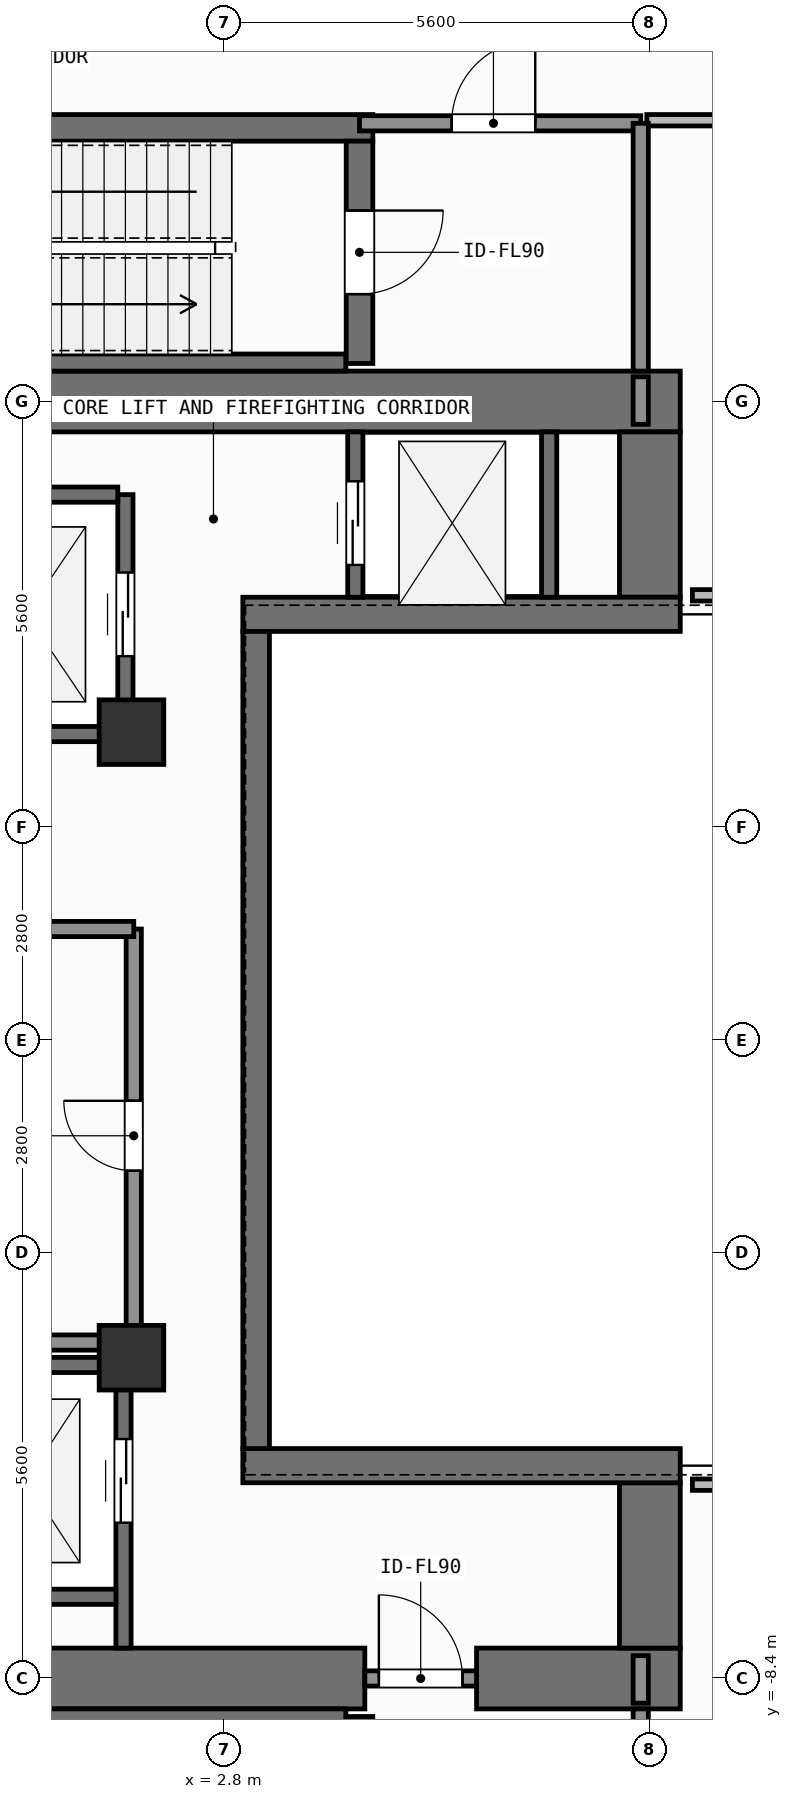
"""IFC4 building model, lengths in metres.
Left out: names, types, materials, properties, quantities, classifications, styles, units other than length and angle.
Written with IfcOpenShell. Run it as: python <this file> out.ifc"""

import sys

from ifc_helpers import new_model, si_unit, direction, frame, frame_2d, origin, origin_2d, place, context, subcontext, project, spatial, rectangle, extrude, element, fill, save


model = new_model("IFC4")
c1 = context("Model", 3, precision=1e-05, world=origin(), true_north=direction((0.0, 1.0)))
c2 = subcontext(c1, "Body", "Model", "MODEL_VIEW")
j1 = project(units=[si_unit("LENGTHUNIT", "METRE"), si_unit("PLANEANGLEUNIT", "RADIAN")], contexts=[c1])
p1 = place(None, origin())
s1 = spatial("IfcSite", under=j1, at=p1, CompositionType="ELEMENT")
p2 = place(p1, origin())
s2 = spatial("IfcBuilding", under=s1, at=p2, CompositionType="ELEMENT")
p3 = place(p2, frame((0.0, 0.0, 171.9)))
s3 = spatial("IfcBuildingStorey", under=s2, at=p3, CompositionType="ELEMENT", Elevation=171.9)
p4 = place(p3, frame((-2.62, -8.4, 0.0), z_axis=(0.0, 0.0, 1.0), x_axis=(1.0, 0.0, 0.0)))
e1 = element("IfcWall", 1, at=p4, inside=s3, PredefinedType="SHEAR", context=c2, shape_type="SweptSolid", body=[
    extrude(rectangle(XDim=7.27, YDim=0.8, at=frame_2d((3.635, 0.0))), origin(), (0.0, 0.0, 1.0), 3.9),
])
p5 = place(p3, frame((6.12, -8.4, 0.0), z_axis=(0.0, 0.0, 1.0), x_axis=(1.0, 0.0, 0.0)))
e2 = element("IfcWall", 2, at=p5, inside=s3, PredefinedType="SHEAR", context=c2, shape_type="SweptSolid", body=[
    extrude(rectangle(XDim=2.68, YDim=0.8, at=frame_2d((1.34, 0.0))), origin(), (0.0, 0.0, 1.0), 3.9),
])
p6 = place(p3, frame((-7.55, 8.4, 0.0), z_axis=(0.0, 0.0, 1.0), x_axis=(1.0, 0.0, 0.0)))
e3 = element("IfcWall", 3, at=p6, inside=s3, PredefinedType="SHEAR", context=c2, shape_type="SweptSolid", body=[
    extrude(rectangle(XDim=16.35, YDim=0.8, at=frame_2d((8.175, 0.0))), origin(), (0.0, 0.0, 1.0), 3.9),
])
for number, where, z_axis, x_axis in (
    (4, (8.4, -8.0, 0.0), (0.0, 0.0, 1.0), (0.0, 1.0, 0.0)),
    (5, (8.4, 5.825, 0.0), (0.0, 0.0, 1.0), (0.0, 1.0, 0.0)),
):
    element("IfcWall", number, at=place(p3, frame(where, z_axis=z_axis, x_axis=x_axis)), inside=s3, PredefinedType="SHEAR", context=c2, shape_type="SweptSolid", body=[
        extrude(rectangle(XDim=2.175, YDim=0.8, at=frame_2d((1.087, 0.0))), origin(), (0.0, 0.0, 1.0), 3.9),
    ])
for number, where, z_axis, x_axis in (
    (6, (3.045, -5.6, 0.0), (0.0, 0.0, 1.0), (1.0, 0.0, 0.0)),
    (7, (3.045, 5.6, 0.0), (0.0, 0.0, 1.0), (1.0, 0.0, 0.0)),
):
    element("IfcWall", number, at=place(p3, frame(where, z_axis=z_axis, x_axis=x_axis)), inside=s3, PredefinedType="SHEAR", context=c2, shape_type="SweptSolid", body=[
        extrude(rectangle(XDim=5.755, YDim=0.45, at=frame_2d((2.877, 0.0))), origin(), (0.0, 0.0, 1.0), 3.9),
    ])
p7 = place(p3, frame((3.22, -5.375, 0.0), z_axis=(0.0, 0.0, 1.0), x_axis=(0.0, 1.0, 0.0)))
e8 = element("IfcWall", 8, at=p7, inside=s3, PredefinedType="SHEAR", context=c2, shape_type="SweptSolid", body=[
    extrude(rectangle(XDim=10.75, YDim=0.35, at=frame_2d((5.375, 0.0))), origin(), (0.0, 0.0, 1.0), 3.9),
])
p8 = place(p3, frame((-2.2, -8.913, 0.0), z_axis=(0.0, 0.0, 1.0), x_axis=(1.0, 0.0, 0.0)))
e9 = element("IfcWall", 9, at=p8, inside=s3, PredefinedType="SHEAR", context=c2, shape_type="SweptSolid", body=[
    extrude(rectangle(XDim=6.6, YDim=0.225, at=frame_2d((3.3, 0.0))), origin(), (0.0, 0.0, 1.0), 3.9),
])
p9 = place(p3, frame((4.58, -8.9, 0.0), z_axis=(0.0, 0.0, 1.0), x_axis=(0.0, -1.0, 0.0)))
e10 = element("IfcWall", 10, at=p9, inside=s3, PredefinedType="SHEAR", context=c2, shape_type="SweptSolid", body=[
    extrude(rectangle(XDim=2.925, YDim=0.35, at=frame_2d((1.462, 0.0))), origin(), (0.0, 0.0, 1.0), 3.9),
])
p10 = place(p9, frame((0.913, 0.0, 0.0)))
e11 = element("IfcOpeningElement", 11, at=p10, cuts=e10, PredefinedType="OPENING", context=c2, shape_type="SweptSolid", body=[
    extrude(rectangle(XDim=1.1, YDim=2.15, at=frame_2d((0.55, 1.075))), frame((0.0, 0.185, 0.0), z_axis=(0.0, -1.0, 0.0), x_axis=(1.0, 0.0, 0.0)), (0.0, 0.0, 1.0), 0.37),
])
p11 = place(p3, frame((-2.555, 12.0, 0.0), z_axis=(0.0, 0.0, 1.0), x_axis=(1.0, 0.0, 0.0)))
e12 = element("IfcWall", 12, at=p11, inside=s3, PredefinedType="SHEAR", context=c2, shape_type="SweptSolid", body=[
    extrude(rectangle(XDim=7.31, YDim=0.35, at=frame_2d((3.655, 0.0))), origin(), (0.0, 0.0, 1.0), 3.9),
])
p12 = place(p3, frame((-2.2, 8.913, 0.0), z_axis=(0.0, 0.0, 1.0), x_axis=(1.0, 0.0, 0.0)))
e13 = element("IfcWall", 13, at=p12, inside=s3, PredefinedType="SHEAR", context=c2, shape_type="SweptSolid", body=[
    extrude(rectangle(XDim=6.6, YDim=0.225, at=frame_2d((3.3, 0.0))), origin(), (0.0, 0.0, 1.0), 3.9),
])
p13 = place(p3, frame((4.58, 11.825, 0.0), z_axis=(0.0, 0.0, 1.0), x_axis=(0.0, -1.0, 0.0)))
e14 = element("IfcWall", 14, at=p13, inside=s3, PredefinedType="SHEAR", context=c2, shape_type="SweptSolid", body=[
    extrude(rectangle(XDim=2.925, YDim=0.35, at=frame_2d((1.462, 0.0))), origin(), (0.0, 0.0, 1.0), 3.9),
])
p14 = place(p13, frame((0.913, 0.0, 0.0)))
e15 = element("IfcOpeningElement", 15, at=p14, cuts=e14, PredefinedType="OPENING", context=c2, shape_type="SweptSolid", body=[
    extrude(rectangle(XDim=1.1, YDim=2.15, at=frame_2d((0.55, 1.075))), frame((0.0, 0.185, 0.0), z_axis=(0.0, -1.0, 0.0), x_axis=(1.0, 0.0, 0.0)), (0.0, 0.0, 1.0), 0.37),
])
for number, where, z_axis, x_axis in (
    (16, (1.58, -4.18, 0.0), (0.0, 0.0, 1.0), (1.0, 0.0, 0.0)),
    (17, (1.58, 4.05, 0.0), (0.0, 0.0, 1.0), (1.0, 0.0, 0.0)),
):
    element("IfcColumn", number, at=place(p3, frame(where, z_axis=z_axis, x_axis=x_axis)), inside=s3, PredefinedType="COLUMN", context=c2, shape_type="SweptSolid", body=[
        extrude(rectangle(XDim=0.85, YDim=0.85, at=origin_2d()), origin(), (0.0, 0.0, 1.0), 3.9),
    ])
p15 = place(p3, frame((1.5, 4.025, 0.0), z_axis=(0.0, 0.0, 1.0), x_axis=(0.0, 1.0, 0.0)))
e18 = element("IfcWall", 18, at=p15, inside=s3, PredefinedType="SHEAR", context=c2, shape_type="SweptSolid", body=[
    extrude(rectangle(XDim=3.15, YDim=0.2, at=frame_2d((1.575, 0.0))), origin(), (0.0, 0.0, 1.0), 3.68),
])
p16 = place(p15, frame((1.025, 0.0, 0.0)))
e19 = element("IfcOpeningElement", 19, at=p16, cuts=e18, PredefinedType="OPENING", context=c2, shape_type="SweptSolid", body=[
    extrude(rectangle(XDim=1.1, YDim=2.2, at=frame_2d((0.55, 1.1))), frame((0.0, 0.11, 0.0), z_axis=(0.0, -1.0, 0.0), x_axis=(1.0, 0.0, 0.0)), (0.0, 0.0, 1.0), 0.22),
])
for number, where, z_axis, x_axis in (
    (20, (-1.0, 4.025, 0.0), (0.0, 0.0, 1.0), (1.0, 0.0, 0.0)),
    (21, (-1.0, 7.175, 0.0), (0.0, 0.0, 1.0), (1.0, 0.0, 0.0)),
):
    element("IfcWall", number, at=place(p3, frame(where, z_axis=z_axis, x_axis=x_axis)), inside=s3, PredefinedType="SHEAR", context=c2, shape_type="SweptSolid", body=[
        extrude(rectangle(XDim=2.4, YDim=0.2, at=frame_2d((1.2, 0.0))), origin(), (0.0, 0.0, 1.0), 3.68),
    ])
p17 = place(p3, frame((1.475, -8.0, 0.0), z_axis=(0.0, 0.0, 1.0), x_axis=(0.0, 1.0, 0.0)))
e22 = element("IfcWall", 22, at=p17, inside=s3, PredefinedType="SHEAR", context=c2, shape_type="SweptSolid", body=[
    extrude(rectangle(XDim=3.725, YDim=0.2, at=frame_2d((1.863, 0.0))), origin(), (0.0, 0.0, 1.0), 3.68),
])
p18 = place(p17, frame((1.65, 0.0, 0.0)))
e23 = element("IfcOpeningElement", 23, at=p18, cuts=e22, PredefinedType="OPENING", context=c2, shape_type="SweptSolid", body=[
    extrude(rectangle(XDim=1.1, YDim=2.2, at=frame_2d((0.55, 1.1))), frame((0.0, 0.11, 0.0), z_axis=(0.0, -1.0, 0.0), x_axis=(1.0, 0.0, 0.0)), (0.0, 0.0, 1.0), 0.22),
])
for number, where, z_axis, x_axis in (
    (24, (-0.975, -7.325, 0.0), (0.0, 0.0, 1.0), (1.0, 0.0, 0.0)),
    (25, (-0.975, -4.275, 0.0), (0.0, 0.0, 1.0), (1.0, 0.0, 0.0)),
):
    element("IfcWall", number, at=place(p3, frame(where, z_axis=z_axis, x_axis=x_axis)), inside=s3, PredefinedType="SHEAR", context=c2, shape_type="SweptSolid", body=[
        extrude(rectangle(XDim=2.35, YDim=0.2, at=frame_2d((1.175, 0.0))), origin(), (0.0, 0.0, 1.0), 3.68),
    ])
p19 = place(p3, frame((4.525, 5.825, 0.0), z_axis=(0.0, 0.0, 1.0), x_axis=(0.0, 1.0, 0.0)))
e26 = element("IfcWall", 26, at=p19, inside=s3, PredefinedType="SHEAR", context=c2, shape_type="SweptSolid", body=[
    extrude(rectangle(XDim=2.175, YDim=0.2, at=frame_2d((1.087, 0.0))), origin(), (0.0, 0.0, 1.0), 3.68),
])
p20 = place(p19, frame((0.425, 0.0, 0.0)))
e27 = element("IfcOpeningElement", 27, at=p20, cuts=e26, PredefinedType="OPENING", context=c2, shape_type="SweptSolid", body=[
    extrude(rectangle(XDim=1.1, YDim=2.2, at=frame_2d((0.55, 1.1))), frame((0.0, 0.11, 0.0), z_axis=(0.0, -1.0, 0.0), x_axis=(1.0, 0.0, 0.0)), (0.0, 0.0, 1.0), 0.22),
])
p21 = place(p3, frame((7.075, 5.825, 0.0), z_axis=(0.0, 0.0, 1.0), x_axis=(0.0, 1.0, 0.0)))
e28 = element("IfcWall", 28, at=p21, inside=s3, PredefinedType="SHEAR", context=c2, shape_type="SweptSolid", body=[
    extrude(rectangle(XDim=2.175, YDim=0.2, at=frame_2d((1.087, 0.0))), origin(), (0.0, 0.0, 1.0), 3.68),
])
p22 = place(p3, frame((4.65, -8.4, 0.0), z_axis=(0.0, 0.0, 1.0), x_axis=(1.0, 0.0, 0.0)))
e29 = element("IfcWall", 29, at=p22, inside=s3, PredefinedType="SOLIDWALL", context=c2, shape_type="SweptSolid", body=[
    extrude(rectangle(XDim=1.47, YDim=0.2, at=frame_2d((0.735, 0.0))), origin(), (0.0, 0.0, 1.0), 2.82),
])
p23 = place(p22, frame((0.185, 0.0, 0.0)))
e30 = element("IfcOpeningElement", 30, at=p23, cuts=e29, PredefinedType="OPENING", context=c2, shape_type="SweptSolid", body=[
    extrude(rectangle(XDim=1.1, YDim=2.15, at=frame_2d((0.55, 1.075))), frame((0.0, 0.11, 0.0), z_axis=(0.0, -1.0, 0.0), x_axis=(1.0, 0.0, 0.0)), (0.0, 0.0, 1.0), 0.22),
])
p24 = place(p3, frame((4.58, 12.06, 0.0), z_axis=(0.0, 0.0, 1.0), x_axis=(1.0, 0.0, 0.0)))
e31 = element("IfcWall", 31, at=p24, inside=s3, PredefinedType="SOLIDWALL", context=c2, shape_type="SweptSolid", body=[
    extrude(rectangle(XDim=3.7, YDim=0.2, at=frame_2d((1.85, 0.0))), origin(), (0.0, 0.0, 1.0), 3.68),
])
p25 = place(p24, frame((1.212, 0.0, 0.0)))
e32 = element("IfcOpeningElement", 32, at=p25, cuts=e31, PredefinedType="OPENING", context=c2, shape_type="SweptSolid", body=[
    extrude(rectangle(XDim=1.1, YDim=2.15, at=frame_2d((0.55, 1.075))), frame((0.0, 0.11, 0.0), z_axis=(0.0, -1.0, 0.0), x_axis=(1.0, 0.0, 0.0)), (0.0, 0.0, 1.0), 0.22),
])
p26 = place(p3, frame((1.61, -3.98, 0.0), z_axis=(0.0, 0.0, 1.0), x_axis=(0.0, 1.0, 0.0)))
e33 = element("IfcWall", 33, at=p26, inside=s3, PredefinedType="SOLIDWALL", context=c2, shape_type="SweptSolid", body=[
    extrude(rectangle(XDim=5.44, YDim=0.2, at=frame_2d((2.72, 0.0))), origin(), (0.0, 0.0, 1.0), 3.68),
])
p27 = place(p26, frame((2.26, 0.0, 0.0)))
e34 = element("IfcOpeningElement", 34, at=p27, cuts=e33, PredefinedType="OPENING", context=c2, shape_type="SweptSolid", body=[
    extrude(rectangle(XDim=0.92, YDim=2.1, at=frame_2d((0.46, 1.05))), frame((0.0, 0.11, 0.0), z_axis=(0.0, -1.0, 0.0), x_axis=(1.0, 0.0, 0.0)), (0.0, 0.0, 1.0), 0.22),
])
p28 = place(p3, frame((8.36, 12.1, 0.0), z_axis=(0.0, 0.0, 1.0), x_axis=(1.0, 0.0, 0.0)))
e35 = element("IfcWall", 35, at=p28, inside=s3, PredefinedType="PARTITIONING", context=c2, shape_type="SweptSolid", body=[
    extrude(rectangle(XDim=7.22, YDim=0.15, at=frame_2d((3.61, 0.0))), origin(), (0.0, 0.0, 1.0), 3.68),
])
p29 = place(p28, frame((3.513, 0.0, 0.0)))
e36 = element("IfcOpeningElement", 36, at=p29, cuts=e35, PredefinedType="OPENING", context=c2, shape_type="SweptSolid", body=[
    extrude(rectangle(XDim=0.9, YDim=2.1, at=frame_2d((0.45, 1.05))), frame((0.0, 0.085, 0.0), z_axis=(0.0, -1.0, 0.0), x_axis=(1.0, 0.0, 0.0)), (0.0, 0.0, 1.0), 0.17),
])
for number, where, z_axis, x_axis in (
    (37, (8.28, -12.06, 0.0), (0.0, 0.0, 1.0), (0.0, 1.0, 0.0)),
    (38, (8.28, 8.8, 0.0), (0.0, 0.0, 1.0), (0.0, 1.0, 0.0)),
):
    element("IfcWall", number, at=place(p3, frame(where, z_axis=z_axis, x_axis=x_axis)), inside=s3, PredefinedType="SOLIDWALL", context=c2, shape_type="SweptSolid", body=[
        extrude(rectangle(XDim=3.26, YDim=0.2, at=frame_2d((1.63, 0.0))), origin(), (0.0, 0.0, 1.0), 3.68),
    ])
for number, where, z_axis, x_axis in (
    (39, (-1.58, -3.98, 0.0), (0.0, 0.0, 1.0), (1.0, 0.0, 0.0)),
    (40, (-1.58, 1.46, 0.0), (0.0, 0.0, 1.0), (1.0, 0.0, 0.0)),
):
    element("IfcWall", number, at=place(p3, frame(where, z_axis=z_axis, x_axis=x_axis)), inside=s3, PredefinedType="SOLIDWALL", context=c2, shape_type="SweptSolid", body=[
        extrude(rectangle(XDim=3.19, YDim=0.2, at=frame_2d((1.595, 0.0))), origin(), (0.0, 0.0, 1.0), 3.68),
    ])
p30 = place(p3, frame((8.28, -8.725, 0.0), z_axis=(0.0, 0.0, 1.0), x_axis=(0.0, 1.0, 0.0)))
e41 = element("IfcWall", 41, at=p30, inside=s3, PredefinedType="SOLIDWALL", context=c2, shape_type="SweptSolid", body=[
    extrude(rectangle(XDim=0.625, YDim=0.2, at=frame_2d((0.312, 0.0))), origin(), (0.0, 0.0, 1.0), 3.68),
])
p31 = place(p3, frame((8.96, -5.85, 0.0), z_axis=(0.0, 0.0, 1.0), x_axis=(1.0, 0.0, 0.0)))
e42 = element("IfcWall", 42, at=p31, inside=s3, PredefinedType="PARTITIONING", context=c2, shape_type="SweptSolid", body=[
    extrude(rectangle(XDim=6.62, YDim=0.15, at=frame_2d((3.31, 0.0))), origin(), (0.0, 0.0, 1.0), 3.68),
])
p32 = place(p3, frame((8.28, 8.1, 0.0), z_axis=(0.0, 0.0, 1.0), x_axis=(0.0, 1.0, 0.0)))
e43 = element("IfcWall", 43, at=p32, inside=s3, PredefinedType="SOLIDWALL", context=c2, shape_type="SweptSolid", body=[
    extrude(rectangle(XDim=0.625, YDim=0.2, at=frame_2d((0.312, 0.0))), origin(), (0.0, 0.0, 1.0), 3.68),
])
p33 = place(p3, frame((8.96, 5.85, 0.0), z_axis=(0.0, 0.0, 1.0), x_axis=(1.0, 0.0, 0.0)))
e44 = element("IfcWall", 44, at=p33, inside=s3, PredefinedType="PARTITIONING", context=c2, shape_type="SweptSolid", body=[
    extrude(rectangle(XDim=6.62, YDim=0.15, at=frame_2d((3.31, 0.0))), origin(), (0.0, 0.0, 1.0), 3.68),
])
p34 = place(p16, origin())
e45 = element("IfcDoor", 45, at=p34, inside=s3, OperationType="SLIDING_TO_LEFT", PredefinedType="DOOR", context=c2, shape_type="SweptSolid", body=[
    extrude(rectangle(XDim=1.1, YDim=2.2, at=frame_2d((0.55, 1.1))), frame((0.0, 0.025, 0.0), z_axis=(0.0, -1.0, 0.0), x_axis=(1.0, 0.0, 0.0)), (0.0, 0.0, 1.0), 0.05),
])
fill(e19, e45)
p35 = place(p18, origin())
e46 = element("IfcDoor", 46, at=p35, inside=s3, OperationType="SLIDING_TO_LEFT", PredefinedType="DOOR", context=c2, shape_type="SweptSolid", body=[
    extrude(rectangle(XDim=1.1, YDim=2.2, at=frame_2d((0.55, 1.1))), frame((0.0, 0.025, 0.0), z_axis=(0.0, -1.0, 0.0), x_axis=(1.0, 0.0, 0.0)), (0.0, 0.0, 1.0), 0.05),
])
fill(e23, e46)
p36 = place(p20, origin())
e47 = element("IfcDoor", 47, at=p36, inside=s3, OperationType="SLIDING_TO_LEFT", PredefinedType="DOOR", context=c2, shape_type="SweptSolid", body=[
    extrude(rectangle(XDim=1.1, YDim=2.2, at=frame_2d((0.55, 1.1))), frame((0.0, 0.025, 0.0), z_axis=(0.0, -1.0, 0.0), x_axis=(1.0, 0.0, 0.0)), (0.0, 0.0, 1.0), 0.05),
])
fill(e27, e47)
p37 = place(p14, origin())
e48 = element("IfcDoor", 48, at=p37, inside=s3, OperationType="SINGLE_SWING_LEFT", PredefinedType="DOOR", context=c2, shape_type="SweptSolid", body=[
    extrude(rectangle(XDim=1.1, YDim=2.15, at=frame_2d((0.55, 1.075))), frame((0.0, 0.025, 0.0), z_axis=(0.0, -1.0, 0.0), x_axis=(1.0, 0.0, 0.0)), (0.0, 0.0, 1.0), 0.05),
])
fill(e15, e48)
p38 = place(p23, origin())
e49 = element("IfcDoor", 49, at=p38, inside=s3, OperationType="SINGLE_SWING_LEFT", PredefinedType="DOOR", context=c2, shape_type="SweptSolid", body=[
    extrude(rectangle(XDim=1.1, YDim=2.15, at=frame_2d((0.55, 1.075))), frame((0.0, 0.025, 0.0), z_axis=(0.0, -1.0, 0.0), x_axis=(1.0, 0.0, 0.0)), (0.0, 0.0, 1.0), 0.05),
])
fill(e30, e49)
p39 = place(p25, origin())
e50 = element("IfcDoor", 50, at=p39, inside=s3, OperationType="SINGLE_SWING_RIGHT", PredefinedType="DOOR", context=c2, shape_type="SweptSolid", body=[
    extrude(rectangle(XDim=1.1, YDim=2.15, at=frame_2d((0.55, 1.075))), frame((0.0, 0.025, 0.0), z_axis=(0.0, -1.0, 0.0), x_axis=(1.0, 0.0, 0.0)), (0.0, 0.0, 1.0), 0.05),
])
fill(e32, e50)
p40 = place(p27, origin())
e51 = element("IfcDoor", 51, at=p40, inside=s3, OperationType="SINGLE_SWING_RIGHT", PredefinedType="DOOR", context=c2, shape_type="SweptSolid", body=[
    extrude(rectangle(XDim=0.92, YDim=2.1, at=frame_2d((0.46, 1.05))), frame((0.0, 0.025, 0.0), z_axis=(0.0, -1.0, 0.0), x_axis=(1.0, 0.0, 0.0)), (0.0, 0.0, 1.0), 0.05),
])
fill(e34, e51)
save(model, sys.argv[1])
